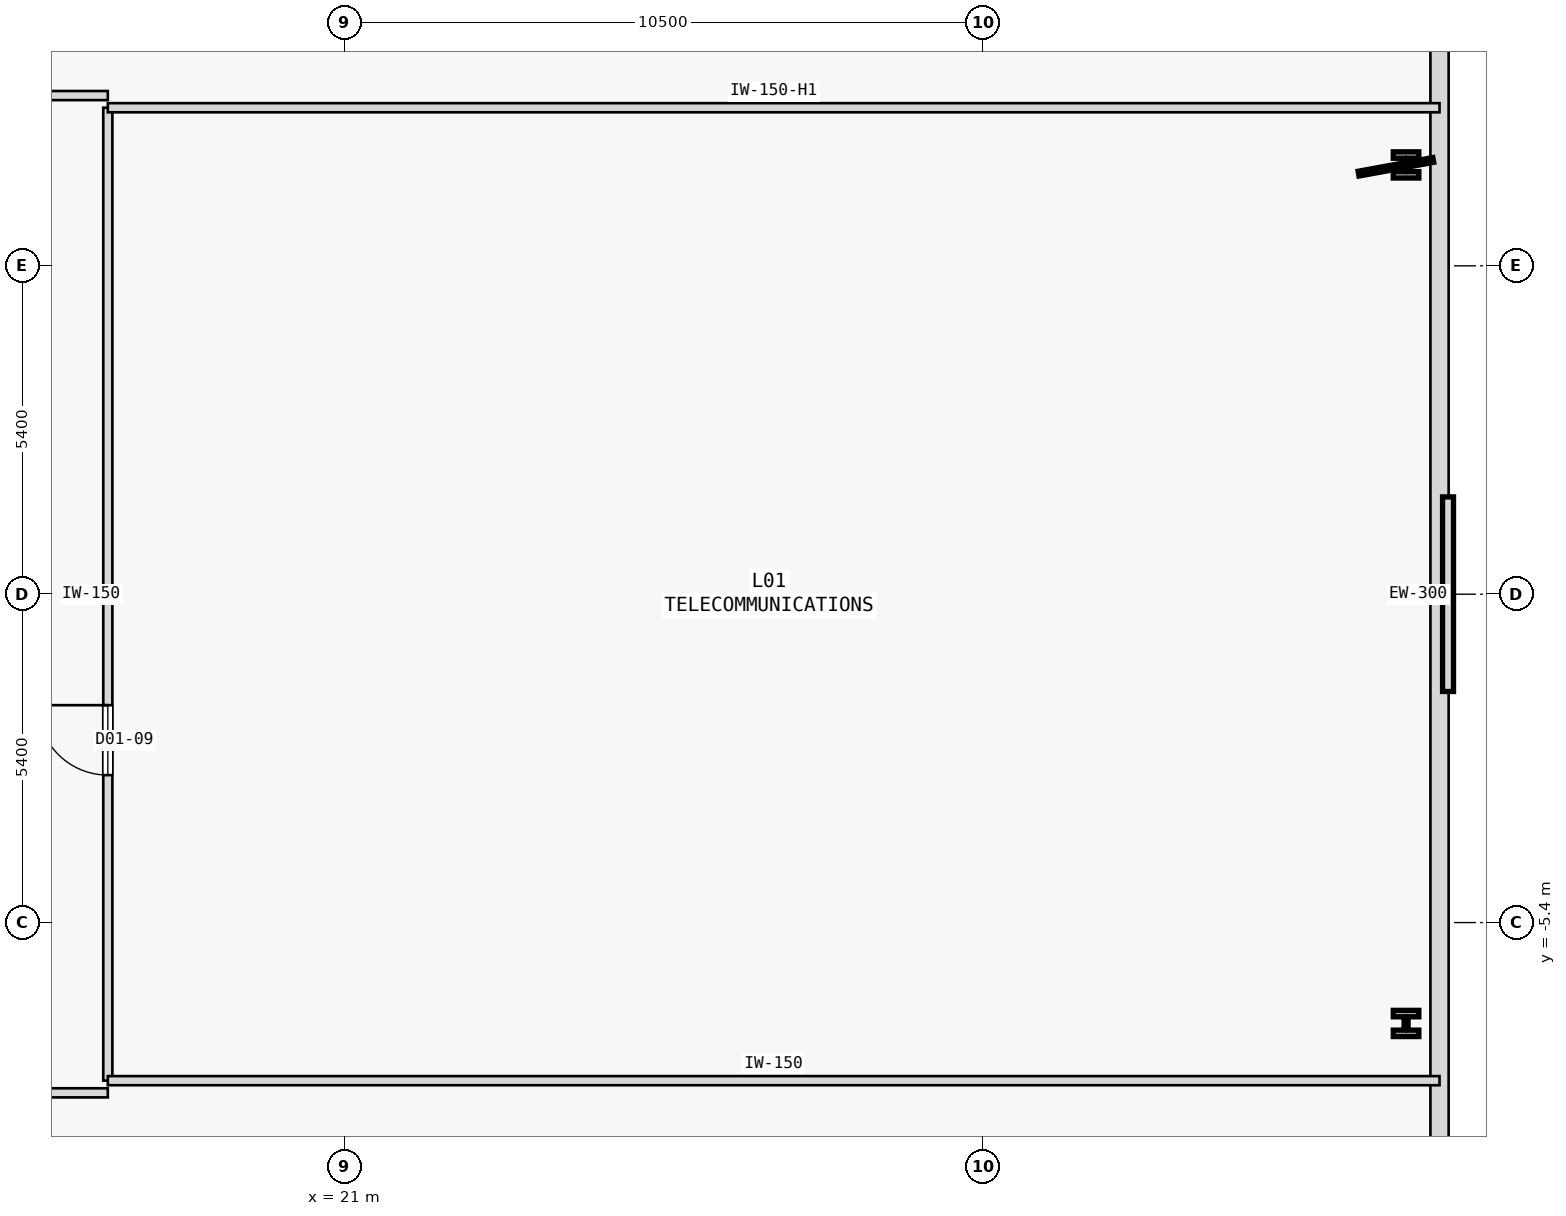
"""IFC4 building model, lengths in metres.
Left out: names, types, materials, properties, quantities, classifications, styles, units other than length and angle.
Written with IfcOpenShell. Run it as: python <this file> out.ifc"""

import sys

from ifc_helpers import new_model, si_unit, direction, frame, frame_2d, origin, origin_2d, place, context, subcontext, project, spatial, rectangle, i_section, extrude, element, fill, save


model = new_model("IFC4")
c1 = context("Model", 3, precision=1e-05, world=origin(), true_north=direction((0.0, 1.0)))
c2 = subcontext(c1, "Body", "Model", "MODEL_VIEW")
j1 = project(units=[si_unit("LENGTHUNIT", "METRE"), si_unit("PLANEANGLEUNIT", "RADIAN")], contexts=[c1])
p1 = place(None, origin())
s1 = spatial("IfcSite", under=j1, at=p1, CompositionType="ELEMENT")
p2 = place(p1, origin())
s2 = spatial("IfcBuilding", under=s1, at=p2, CompositionType="ELEMENT")
p3 = place(p2, frame((0.0, 0.0, 9.6)))
s3 = spatial("IfcBuildingStorey", under=s2, at=p3, CompositionType="ELEMENT", Elevation=9.6)
for number, where, z_axis, x_axis in (
    (1, (38.45, -7.059, 0.0), (0.0, 0.0, 1.0), (1.0, 0.0, 0.0)),
    (2, (38.45, 7.059, 0.0), (0.0, 0.0, 1.0), (1.0, 0.0, 0.0)),
):
    element("IfcColumn", number, at=place(p3, frame(where, z_axis=z_axis, x_axis=x_axis)), inside=s3, PredefinedType="COLUMN", context=c2, shape_type="SweptSolid", body=[
        extrude(i_section(OverallWidth=0.42, OverallDepth=0.431, WebThickness=0.065, FlangeThickness=0.106, FilletRadius=0.015, at=origin_2d()), origin(), (0.0, 0.0, 1.0), 4.6),
    ])
p4 = place(p3, frame((39.0, -21.455, 0.0), z_axis=(0.0, 0.0, 1.0), x_axis=(0.0, 1.0, 0.0)))
e3 = element("IfcWall", 3, at=p4, inside=s3, PredefinedType="STANDARD", context=c2, shape_type="SweptSolid", body=[
    extrude(rectangle(XDim=42.91, YDim=0.3, at=frame_2d((21.455, 0.0))), origin(), (0.0, 0.0, 1.0), 4.375),
])
p5 = place(p3, frame((-2.0, 8.2, 0.0), z_axis=(0.0, 0.0, 1.0), x_axis=(1.0, 0.0, 0.0)))
e4 = element("IfcWall", 4, at=p5, inside=s3, PredefinedType="PARTITIONING", context=c2, shape_type="SweptSolid", body=[
    extrude(rectangle(XDim=19.1, YDim=0.15, at=frame_2d((9.55, 0.0))), origin(), (0.0, 0.0, 1.0), 4.375),
])
p6 = place(p5, frame((8.975, 0.0, 0.0)))
e5 = element("IfcOpeningElement", 5, at=p6, cuts=e4, PredefinedType="OPENING", context=c2, shape_type="SweptSolid", body=[
    extrude(rectangle(XDim=1.15, YDim=2.15, at=frame_2d((0.575, 1.075))), frame((0.0, 0.085, 0.0), z_axis=(0.0, -1.0, 0.0), x_axis=(1.0, 0.0, 0.0)), (0.0, 0.0, 1.0), 0.17),
])
p7 = place(p3, frame((2.5, -8.2, 0.0), z_axis=(0.0, 0.0, 1.0), x_axis=(1.0, 0.0, 0.0)))
e6 = element("IfcWall", 6, at=p7, inside=s3, PredefinedType="PARTITIONING", context=c2, shape_type="SweptSolid", body=[
    extrude(rectangle(XDim=14.6, YDim=0.15, at=frame_2d((7.3, 0.0))), origin(), (0.0, 0.0, 1.0), 4.375),
])
p8 = place(p7, frame((4.535, 0.0, 0.0)))
e7 = element("IfcOpeningElement", 7, at=p8, cuts=e6, PredefinedType="OPENING", context=c2, shape_type="SweptSolid", body=[
    extrude(rectangle(XDim=1.15, YDim=2.15, at=frame_2d((0.575, 1.075))), frame((0.0, 0.085, 0.0), z_axis=(0.0, -1.0, 0.0), x_axis=(1.0, 0.0, 0.0)), (0.0, 0.0, 1.0), 0.17),
])
p9 = place(p3, frame((17.1, -8.0, 0.0), z_axis=(0.0, 0.0, 1.0), x_axis=(0.0, 1.0, 0.0)))
e8 = element("IfcWall", 8, at=p9, inside=s3, PredefinedType="PARTITIONING", context=c2, shape_type="SweptSolid", body=[
    extrude(rectangle(XDim=16.0, YDim=0.15, at=frame_2d((8.0, 0.0))), origin(), (0.0, 0.0, 1.0), 4.375),
])
p10 = place(p9, frame((5.025, 0.0, 0.0)))
e9 = element("IfcOpeningElement", 9, at=p10, cuts=e8, PredefinedType="OPENING", context=c2, shape_type="SweptSolid", body=[
    extrude(rectangle(XDim=1.15, YDim=2.15, at=frame_2d((0.575, 1.075))), frame((0.0, 0.085, 0.0), z_axis=(0.0, -1.0, 0.0), x_axis=(1.0, 0.0, 0.0)), (0.0, 0.0, 1.0), 0.17),
])
p11 = place(p3, frame((17.1, 8.0, 0.0), z_axis=(0.0, 0.0, 1.0), x_axis=(1.0, 0.0, 0.0)))
e10 = element("IfcWall", 10, at=p11, inside=s3, PredefinedType="PARTITIONING", context=c2, shape_type="SweptSolid", body=[
    extrude(rectangle(XDim=21.9, YDim=0.15, at=frame_2d((10.95, 0.0))), origin(), (0.0, 0.0, 1.0), 3.925),
])
p12 = place(p3, frame((17.1, -8.0, 0.0), z_axis=(0.0, 0.0, 1.0), x_axis=(1.0, 0.0, 0.0)))
e11 = element("IfcWall", 11, at=p12, inside=s3, PredefinedType="PARTITIONING", context=c2, shape_type="SweptSolid", body=[
    extrude(rectangle(XDim=21.9, YDim=0.15, at=frame_2d((10.95, 0.0))), origin(), (0.0, 0.0, 1.0), 4.375),
])
p13 = place(p10, origin())
e12 = element("IfcDoor", 12, at=p13, inside=s3, OperationType="SINGLE_SWING_RIGHT", PredefinedType="DOOR", context=c2, shape_type="SweptSolid", body=[
    extrude(rectangle(XDim=1.15, YDim=2.15, at=frame_2d((0.575, 1.075))), frame((0.0, 0.025, 0.0), z_axis=(0.0, -1.0, 0.0), x_axis=(1.0, 0.0, 0.0)), (0.0, 0.0, 1.0), 0.05),
])
fill(e9, e12)
save(model, sys.argv[1])
